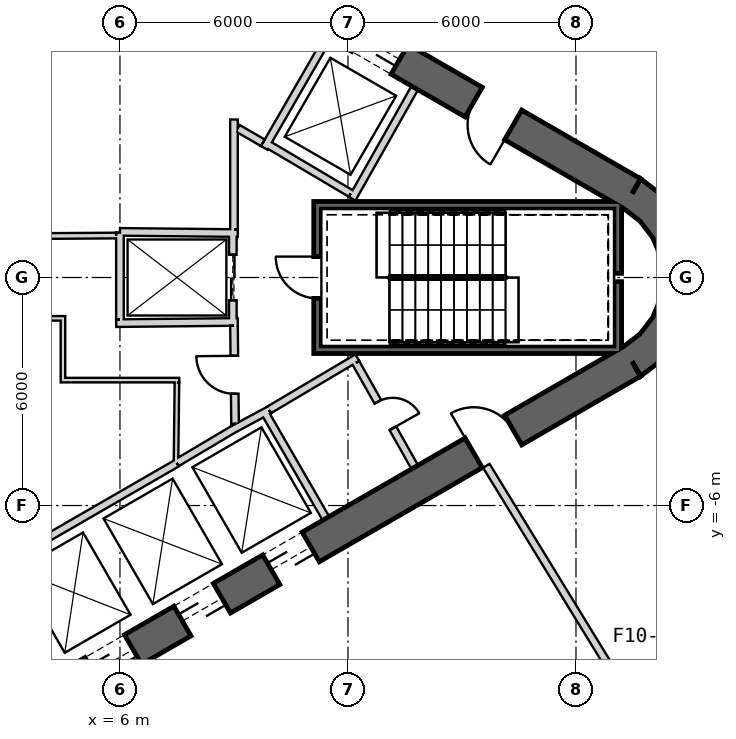
"""IFC4 building model, lengths in metres.
Left out: names, types, materials, properties, quantities, classifications, styles, units other than length and angle.
Written with IfcOpenShell. Run it as: python <this file> out.ifc"""

import sys

from ifc_helpers import new_model, si_unit, direction, frame, frame_2d, origin, place, context, subcontext, project, spatial, polyline, rectangle, outline, extrude, element, fill, save


model = new_model("IFC4")
c1 = context("Model", 3, precision=1e-05, world=origin(), true_north=direction((0.0, 1.0)))
c2 = subcontext(c1, "Body", "Model", "MODEL_VIEW")
j1 = project(units=[si_unit("LENGTHUNIT", "METRE"), si_unit("PLANEANGLEUNIT", "RADIAN")], contexts=[c1])
p1 = place(None, origin())
s1 = spatial("IfcSite", under=j1, at=p1, CompositionType="ELEMENT")
p2 = place(p1, origin())
s2 = spatial("IfcBuilding", under=s1, at=p2, CompositionType="ELEMENT")
p3 = place(p2, frame((0.0, 0.0, 156.2)))
s3 = spatial("IfcBuildingStorey", under=s2, at=p3, CompositionType="ELEMENT", Elevation=156.2)
p4 = place(p3, frame((19.475, 2.208, 0.0), z_axis=(0.0, 0.0, 1.0), x_axis=(-0.866028369851, 0.499994862586, 0.0)))
e1 = element("IfcWall", 1, at=p4, inside=s3, PredefinedType="SHEAR", context=c2, shape_type="SweptSolid", body=[
    extrude(rectangle(XDim=31.523, YDim=0.9, at=frame_2d((15.762, 0.0))), origin(), (0.0, 0.0, 1.0), 7.0),
])
p5 = place(p4, frame((7.062, 0.0, 0.0)))
e2 = element("IfcOpeningElement", 2, at=p5, cuts=e1, PredefinedType="OPENING", context=c2, shape_type="SweptSolid", body=[
    extrude(rectangle(XDim=1.2, YDim=2.4, at=frame_2d((0.6, 1.2))), frame((0.0, 0.46, 0.0), z_axis=(0.0, -1.0, 0.0), x_axis=(1.0, 0.0, 0.0)), (0.0, 0.0, 1.0), 0.92),
])
p6 = place(p4, frame((15.162, 0.0, 0.0)))
e3 = element("IfcOpeningElement", 3, at=p6, cuts=e1, PredefinedType="OPENING", context=c2, shape_type="SweptSolid", body=[
    extrude(rectangle(XDim=1.2, YDim=2.4, at=frame_2d((0.6, 1.2))), frame((0.0, 0.46, 0.0), z_axis=(0.0, -1.0, 0.0), x_axis=(1.0, 0.0, 0.0)), (0.0, 0.0, 1.0), 0.92),
])
p7 = place(p4, frame((17.862, 0.0, 0.0)))
e4 = element("IfcOpeningElement", 4, at=p7, cuts=e1, PredefinedType="OPENING", context=c2, shape_type="SweptSolid", body=[
    extrude(rectangle(XDim=1.2, YDim=2.4, at=frame_2d((0.6, 1.2))), frame((0.0, 0.46, 0.0), z_axis=(0.0, -1.0, 0.0), x_axis=(1.0, 0.0, 0.0)), (0.0, 0.0, 1.0), 0.92),
])
p8 = place(p4, frame((20.562, 0.0, 0.0)))
e5 = element("IfcOpeningElement", 5, at=p8, cuts=e1, PredefinedType="OPENING", context=c2, shape_type="SweptSolid", body=[
    extrude(rectangle(XDim=1.2, YDim=2.4, at=frame_2d((0.6, 1.2))), frame((0.0, 0.46, 0.0), z_axis=(0.0, -1.0, 0.0), x_axis=(1.0, 0.0, 0.0)), (0.0, 0.0, 1.0), 0.92),
])
p9 = place(p4, frame((23.262, 0.0, 0.0)))
e6 = element("IfcOpeningElement", 6, at=p9, cuts=e1, PredefinedType="OPENING", context=c2, shape_type="SweptSolid", body=[
    extrude(rectangle(XDim=1.2, YDim=2.4, at=frame_2d((0.6, 1.2))), frame((0.0, 0.46, 0.0), z_axis=(0.0, -1.0, 0.0), x_axis=(1.0, 0.0, 0.0)), (0.0, 0.0, 1.0), 0.92),
])
p10 = place(p4, frame((3.612, 0.0, 0.0)))
e7 = element("IfcOpeningElement", 7, at=p10, cuts=e1, PredefinedType="OPENING", context=c2, shape_type="SweptSolid", body=[
    extrude(rectangle(XDim=1.2, YDim=2.4, at=frame_2d((0.6, 1.2))), frame((0.0, 0.46, 0.0), z_axis=(0.0, -1.0, 0.0), x_axis=(1.0, 0.0, 0.0)), (0.0, 0.0, 1.0), 0.92),
])
p11 = place(p4, frame((26.712, 0.0, 0.0)))
e8 = element("IfcOpeningElement", 8, at=p11, cuts=e1, PredefinedType="OPENING", context=c2, shape_type="SweptSolid", body=[
    extrude(rectangle(XDim=1.2, YDim=2.4, at=frame_2d((0.6, 1.2))), frame((0.0, 0.46, 0.0), z_axis=(0.0, -1.0, 0.0), x_axis=(1.0, 0.0, 0.0)), (0.0, 0.0, 1.0), 0.92),
])
p12 = place(p3, frame((-7.825, -17.97, 0.0), z_axis=(0.0, 0.0, 1.0), x_axis=(0.866028369851, 0.499994862586, 0.0)))
e9 = element("IfcWall", 9, at=p12, inside=s3, PredefinedType="SHEAR", context=c2, shape_type="SweptSolid", body=[
    extrude(rectangle(XDim=31.523, YDim=0.9, at=frame_2d((15.762, 0.0))), origin(), (0.0, 0.0, 1.0), 7.0),
])
p13 = place(p12, frame((7.062, 0.0, 0.0)))
e10 = element("IfcOpeningElement", 10, at=p13, cuts=e9, PredefinedType="OPENING", context=c2, shape_type="SweptSolid", body=[
    extrude(rectangle(XDim=1.2, YDim=2.4, at=frame_2d((0.6, 1.2))), frame((0.0, 0.46, 0.0), z_axis=(0.0, -1.0, 0.0), x_axis=(1.0, 0.0, 0.0)), (0.0, 0.0, 1.0), 0.92),
])
p14 = place(p12, frame((9.762, 0.0, 0.0)))
e11 = element("IfcOpeningElement", 11, at=p14, cuts=e9, PredefinedType="OPENING", context=c2, shape_type="SweptSolid", body=[
    extrude(rectangle(XDim=1.2, YDim=2.4, at=frame_2d((0.6, 1.2))), frame((0.0, 0.46, 0.0), z_axis=(0.0, -1.0, 0.0), x_axis=(1.0, 0.0, 0.0)), (0.0, 0.0, 1.0), 0.92),
])
p15 = place(p12, frame((12.462, 0.0, 0.0)))
e12 = element("IfcOpeningElement", 12, at=p15, cuts=e9, PredefinedType="OPENING", context=c2, shape_type="SweptSolid", body=[
    extrude(rectangle(XDim=1.2, YDim=2.4, at=frame_2d((0.6, 1.2))), frame((0.0, 0.46, 0.0), z_axis=(0.0, -1.0, 0.0), x_axis=(1.0, 0.0, 0.0)), (0.0, 0.0, 1.0), 0.92),
])
p16 = place(p12, frame((15.162, 0.0, 0.0)))
e13 = element("IfcOpeningElement", 13, at=p16, cuts=e9, PredefinedType="OPENING", context=c2, shape_type="SweptSolid", body=[
    extrude(rectangle(XDim=1.2, YDim=2.4, at=frame_2d((0.6, 1.2))), frame((0.0, 0.46, 0.0), z_axis=(0.0, -1.0, 0.0), x_axis=(1.0, 0.0, 0.0)), (0.0, 0.0, 1.0), 0.92),
])
p17 = place(p12, frame((17.862, 0.0, 0.0)))
e14 = element("IfcOpeningElement", 14, at=p17, cuts=e9, PredefinedType="OPENING", context=c2, shape_type="SweptSolid", body=[
    extrude(rectangle(XDim=1.2, YDim=2.4, at=frame_2d((0.6, 1.2))), frame((0.0, 0.46, 0.0), z_axis=(0.0, -1.0, 0.0), x_axis=(1.0, 0.0, 0.0)), (0.0, 0.0, 1.0), 0.92),
])
p18 = place(p12, frame((20.562, 0.0, 0.0)))
e15 = element("IfcOpeningElement", 15, at=p18, cuts=e9, PredefinedType="OPENING", context=c2, shape_type="SweptSolid", body=[
    extrude(rectangle(XDim=1.2, YDim=2.4, at=frame_2d((0.6, 1.2))), frame((0.0, 0.46, 0.0), z_axis=(0.0, -1.0, 0.0), x_axis=(1.0, 0.0, 0.0)), (0.0, 0.0, 1.0), 0.92),
])
p19 = place(p12, frame((26.712, 0.0, 0.0)))
e16 = element("IfcOpeningElement", 16, at=p19, cuts=e9, PredefinedType="OPENING", context=c2, shape_type="SweptSolid", body=[
    extrude(rectangle(XDim=1.2, YDim=2.4, at=frame_2d((0.6, 1.2))), frame((0.0, 0.46, 0.0), z_axis=(0.0, -1.0, 0.0), x_axis=(1.0, 0.0, 0.0)), (0.0, 0.0, 1.0), 0.92),
])
p20 = place(p12, frame((3.612, 0.0, 0.0)))
e17 = element("IfcOpeningElement", 17, at=p20, cuts=e9, PredefinedType="OPENING", context=c2, shape_type="SweptSolid", body=[
    extrude(rectangle(XDim=1.2, YDim=2.4, at=frame_2d((0.6, 1.2))), frame((0.0, 0.46, 0.0), z_axis=(0.0, -1.0, 0.0), x_axis=(1.0, 0.0, 0.0)), (0.0, 0.0, 1.0), 0.92),
])
p21 = place(p3, origin())
e18 = element("IfcWall", 18, at=p21, inside=s3, PredefinedType="SHEAR", context=c2, shape_type="SweptSolid", body=[
    extrude(outline(polyline([(19.7, -2.598), (20.321, -2.121), (20.798, -1.5), (21.098, -0.777), (21.2, 0.0), (21.098, 0.777), (20.798, 1.5), (20.321, 2.121), (19.7, 2.598), (19.25, 1.819), (19.685, 1.485), (20.019, 1.05), (20.229, 0.543), (20.3, 0.0), (20.229, -0.543), (20.019, -1.05), (19.685, -1.485), (19.25, -1.819), (19.7, -2.598)])), origin(), (0.0, 0.0, 1.0), 7.0),
])
p22 = place(p3, frame((12.11, 2.073, 0.0), z_axis=(0.0, 0.0, 1.0), x_axis=(0.49196600604, 0.870614408852, 0.0)))
e19 = element("IfcWall", 19, at=p22, inside=s3, PredefinedType="PLUMBINGWALL", context=c2, shape_type="SweptSolid", body=[
    extrude(rectangle(XDim=3.35, YDim=0.2, at=frame_2d((1.675, 0.0))), origin(), (0.0, 0.0, 1.0), 6.65),
])
p23 = place(p3, frame((12.073, 2.211, 0.0), z_axis=(0.0, 0.0, 1.0), x_axis=(-0.860436389768, 0.509557866354, 0.0)))
e20 = element("IfcWall", 20, at=p23, inside=s3, PredefinedType="PLUMBINGWALL", context=c2, shape_type="SweptSolid", body=[
    extrude(rectangle(XDim=2.6, YDim=0.2, at=frame_2d((1.3, 0.0))), origin(), (0.0, 0.0, 1.0), 6.65),
])
p24 = place(p3, frame((9.797, 3.408, 0.0), z_axis=(0.0, 0.0, 1.0), x_axis=(0.499987396469, 0.866032680314, 0.0)))
e21 = element("IfcWall", 21, at=p24, inside=s3, PredefinedType="PLUMBINGWALL", context=c2, shape_type="SweptSolid", body=[
    extrude(rectangle(XDim=3.35, YDim=0.2, at=frame_2d((1.675, 0.0))), origin(), (0.0, 0.0, 1.0), 6.65),
])
p25 = place(p3, frame((0.483, -8.936, 0.0), z_axis=(0.0, 0.0, 1.0), x_axis=(0.866030989016, 0.499990325971, 0.0)))
e22 = element("IfcWall", 22, at=p25, inside=s3, PredefinedType="PLUMBINGWALL", context=c2, shape_type="SweptSolid", body=[
    extrude(rectangle(XDim=8.1, YDim=0.2, at=frame_2d((4.05, 0.0))), origin(), (0.0, 0.0, 1.0), 6.65),
])
p26 = place(p3, frame((9.795, -3.525, 0.0), z_axis=(0.0, 0.0, 1.0), x_axis=(0.499984717929, -0.866034226713, 0.0)))
e23 = element("IfcWall", 23, at=p26, inside=s3, PredefinedType="PLUMBINGWALL", context=c2, shape_type="SweptSolid", body=[
    extrude(rectangle(XDim=3.25, YDim=0.2, at=frame_2d((1.625, 0.0))), origin(), (0.0, 0.0, 1.0), 6.65),
])
p27 = place(p3, frame((8.974, -3.999, 0.0), z_axis=(0.0, 0.0, 1.0), x_axis=(0.880907015104, 0.473289373154, 0.0)))
e24 = element("IfcWall", 24, at=p27, inside=s3, PredefinedType="PLUMBINGWALL", context=c2, shape_type="SweptSolid", body=[
    extrude(rectangle(XDim=1.078, YDim=0.2, at=frame_2d((0.539, 0.0))), origin(), (0.0, 0.0, 1.0), 6.65),
])
p28 = place(p3, frame((7.493, -4.878, 0.0), z_axis=(0.0, 0.0, 1.0), x_axis=(0.859981807212, 0.510324691999, 0.0)))
e25 = element("IfcWall", 25, at=p28, inside=s3, PredefinedType="PLUMBINGWALL", context=c2, shape_type="SweptSolid", body=[
    extrude(rectangle(XDim=1.845, YDim=0.2, at=frame_2d((0.922, 0.0))), origin(), (0.0, 0.0, 1.0), 6.65),
])
p29 = place(p3, frame((19.2, 1.9, -0.35), z_axis=(0.0, 0.0, 1.0), x_axis=(-1.0, 0.0, 0.0)))
e26 = element("IfcWall", 26, at=p29, inside=s3, PredefinedType="SHEAR", context=c2, shape_type="SweptSolid", body=[
    extrude(rectangle(XDim=8.1, YDim=0.2, at=frame_2d((4.05, 0.0))), origin(), (0.0, 0.0, 1.0), 7.0),
])
p30 = place(p3, frame((19.1, -2.0, -0.35), z_axis=(0.0, 0.0, 1.0), x_axis=(0.0, 1.0, 0.0)))
e27 = element("IfcWall", 27, at=p30, inside=s3, PredefinedType="SHEAR", context=c2, shape_type="SweptSolid", body=[
    extrude(rectangle(XDim=1.89, YDim=0.2, at=frame_2d((0.945, 0.0))), origin(), (0.0, 0.0, 1.0), 7.0),
])
p31 = place(p3, frame((19.1, 0.11, -0.35), z_axis=(0.0, 0.0, 1.0), x_axis=(0.0, 1.0, 0.0)))
e28 = element("IfcWall", 28, at=p31, inside=s3, PredefinedType="SHEAR", context=c2, shape_type="SweptSolid", body=[
    extrude(rectangle(XDim=1.69, YDim=0.2, at=frame_2d((0.845, 0.0))), origin(), (0.0, 0.0, 1.0), 7.0),
])
p32 = place(p3, frame((11.1, -1.9, -0.35), z_axis=(0.0, 0.0, 1.0), x_axis=(1.0, 0.0, 0.0)))
e29 = element("IfcWall", 29, at=p32, inside=s3, PredefinedType="SHEAR", context=c2, shape_type="SweptSolid", body=[
    extrude(rectangle(XDim=7.9, YDim=0.2, at=frame_2d((3.95, 0.0))), origin(), (0.0, 0.0, 1.0), 7.0),
])
p33 = place(p3, frame((11.2, -1.8, -0.35), z_axis=(0.0, 0.0, 1.0), x_axis=(0.0, 1.0, 0.0)))
e30 = element("IfcWall", 30, at=p33, inside=s3, PredefinedType="SHEAR", context=c2, shape_type="SweptSolid", body=[
    extrude(rectangle(XDim=3.6, YDim=0.2, at=frame_2d((1.8, 0.0))), origin(), (0.0, 0.0, 1.0), 7.0),
])
p34 = place(p33, frame((1.25, 0.0, 0.35)))
e31 = element("IfcOpeningElement", 31, at=p34, cuts=e30, PredefinedType="OPENING", context=c2, shape_type="SweptSolid", body=[
    extrude(rectangle(XDim=1.1, YDim=2.1, at=frame_2d((0.55, 1.05))), frame((0.0, 0.11, 0.0), z_axis=(0.0, -1.0, 0.0), x_axis=(1.0, 0.0, 0.0)), (0.0, 0.0, 1.0), 0.22),
])
p35 = place(p3, frame((8.97, 1.2, 0.0), z_axis=(0.0, 0.0, 1.0), x_axis=(0.0, -1.0, 0.0)))
e32 = element("IfcWall", 32, at=p35, inside=s3, PredefinedType="PLUMBINGWALL", context=c2, shape_type="SweptSolid", body=[
    extrude(rectangle(XDim=2.4, YDim=0.2, at=frame_2d((1.2, 0.0))), origin(), (0.0, 0.0, 1.0), 6.65),
])
p36 = place(p35, frame((0.6, 0.0, 0.0)))
e33 = element("IfcOpeningElement", 33, at=p36, cuts=e32, PredefinedType="OPENING", context=c2, shape_type="SweptSolid", body=[
    extrude(rectangle(XDim=1.2, YDim=2.4, at=frame_2d((0.6, 1.2))), frame((0.0, 0.11, 0.0), z_axis=(0.0, -1.0, 0.0), x_axis=(1.0, 0.0, 0.0)), (0.0, 0.0, 1.0), 0.22),
])
p37 = place(p3, frame((6.0, 1.2, 0.0), z_axis=(0.0, 0.0, 1.0), x_axis=(0.999949988, -0.010001074852, 0.0)))
e34 = element("IfcWall", 34, at=p37, inside=s3, PredefinedType="PLUMBINGWALL", context=c2, shape_type="SweptSolid", body=[
    extrude(rectangle(XDim=3.1, YDim=0.2, at=frame_2d((1.55, 0.0))), origin(), (0.0, 0.0, 1.0), 6.65),
])
p38 = place(p3, frame((5.9, -1.201, 0.0), z_axis=(0.0, 0.0, 1.0), x_axis=(0.999950064753, 0.009993397809, 0.0)))
e35 = element("IfcWall", 35, at=p38, inside=s3, PredefinedType="PLUMBINGWALL", context=c2, shape_type="SweptSolid", body=[
    extrude(rectangle(XDim=3.2, YDim=0.2, at=frame_2d((1.6, 0.0))), origin(), (0.0, 0.0, 1.0), 6.65),
])
p39 = place(p3, frame((6.0, -1.1, 0.0), z_axis=(0.0, 0.0, 1.0), x_axis=(0.0, 1.0, 0.0)))
e36 = element("IfcWall", 36, at=p39, inside=s3, PredefinedType="PLUMBINGWALL", context=c2, shape_type="SweptSolid", body=[
    extrude(rectangle(XDim=2.28, YDim=0.2, at=frame_2d((1.14, 0.0))), origin(), (0.0, 0.0, 1.0), 6.65),
])
p40 = place(p3, frame((12.245, -2.109, 0.0), z_axis=(0.0, 0.0, 1.0), x_axis=(-0.860414880418, -0.509594185166, 0.0)))
e37 = element("IfcWall", 37, at=p40, inside=s3, PredefinedType="PARTITIONING", context=c2, shape_type="SweptSolid", body=[
    extrude(rectangle(XDim=2.7, YDim=0.2, at=frame_2d((1.35, 0.0))), origin(), (0.0, 0.0, 1.0), 6.65),
])
p41 = place(p3, frame((13.758, -4.99, 0.0), z_axis=(0.0, 0.0, 1.0), x_axis=(-0.491993409184, 0.87059892334, 0.0)))
e38 = element("IfcWall", 38, at=p41, inside=s3, PredefinedType="PARTITIONING", context=c2, shape_type="SweptSolid", body=[
    extrude(rectangle(XDim=3.15, YDim=0.2, at=frame_2d((1.575, 0.0))), origin(), (0.0, 0.0, 1.0), 6.65),
])
p42 = place(p41, frame((1.175, 0.0, 0.0)))
e39 = element("IfcOpeningElement", 39, at=p42, cuts=e38, PredefinedType="OPENING", context=c2, shape_type="SweptSolid", body=[
    extrude(rectangle(XDim=0.8, YDim=2.1, at=frame_2d((0.4, 1.05))), frame((0.0, 0.11, 0.0), z_axis=(0.0, -1.0, 0.0), x_axis=(1.0, 0.0, 0.0)), (0.0, 0.0, 1.0), 0.22),
])
p43 = place(p3, frame((9.0, 1.27, 0.0), z_axis=(0.0, 0.0, 1.0), x_axis=(0.0, 1.0, 0.0)))
e40 = element("IfcWall", 40, at=p43, inside=s3, PredefinedType="PARTITIONING", context=c2, shape_type="SweptSolid", body=[
    extrude(rectangle(XDim=2.887, YDim=0.2, at=frame_2d((1.443, 0.0))), origin(), (0.0, 0.0, 1.0), 6.65),
])
p44 = place(p3, frame((9.76, 3.545, 0.0), z_axis=(0.0, 0.0, 1.0), x_axis=(-0.865966824893, 0.500101447894, 0.0)))
e41 = element("IfcWall", 41, at=p44, inside=s3, PredefinedType="PARTITIONING", context=c2, shape_type="SweptSolid", body=[
    extrude(rectangle(XDim=0.762, YDim=0.2, at=frame_2d((0.381, 0.0))), origin(), (0.0, 0.0, 1.0), 6.65),
])
p45 = place(p3, frame((9.029, -3.851, 0.0), z_axis=(0.0, 0.0, 1.0), x_axis=(-0.010783593937, 0.99994185536, 0.0)))
e42 = element("IfcWall", 42, at=p45, inside=s3, PredefinedType="PARTITIONING", context=c2, shape_type="SweptSolid", body=[
    extrude(rectangle(XDim=2.581, YDim=0.2, at=frame_2d((1.291, 0.0))), origin(), (0.0, 0.0, 1.0), 6.65),
])
p46 = place(p45, frame((0.791, 0.0, 0.0)))
e43 = element("IfcOpeningElement", 43, at=p46, cuts=e42, PredefinedType="OPENING", context=c2, shape_type="SweptSolid", body=[
    extrude(rectangle(XDim=1.0, YDim=2.1, at=frame_2d((0.5, 1.05))), frame((0.0, 0.11, 0.0), z_axis=(0.0, -1.0, 0.0), x_axis=(1.0, 0.0, 0.0)), (0.0, 0.0, 1.0), 0.22),
])
p47 = place(p3, frame((1.388, 1.074, 0.0), z_axis=(0.0, 0.0, 1.0), x_axis=(0.99997856967, 0.006546770205, 0.0)))
e44 = element("IfcWall", 44, at=p47, inside=s3, PredefinedType="PLUMBINGWALL", context=c2, shape_type="SweptSolid", body=[
    extrude(rectangle(XDim=4.512, YDim=0.15, at=frame_2d((2.256, 0.0))), origin(), (0.0, 0.0, 1.0), 6.65),
])
p48 = place(p47, frame((1.92, 0.0, 0.0)))
e45 = element("IfcOpeningElement", 45, at=p48, cuts=e44, PredefinedType="OPENING", context=c2, shape_type="SweptSolid", body=[
    extrude(rectangle(XDim=0.8, YDim=2.1, at=frame_2d((0.4, 1.05))), frame((0.0, 0.085, 0.0), z_axis=(0.0, -1.0, 0.0), x_axis=(1.0, 0.0, 0.0)), (0.0, 0.0, 1.0), 0.17),
])
p49 = place(p3, frame((4.56, -1.075, 0.0), z_axis=(0.0, 0.0, 1.0), x_axis=(-1.0, 0.0, 0.0)))
e46 = element("IfcWall", 46, at=p49, inside=s3, PredefinedType="PARTITIONING", context=c2, shape_type="SweptSolid", body=[
    extrude(rectangle(XDim=3.026, YDim=0.12, at=frame_2d((1.513, 0.0))), origin(), (0.0, 0.0, 1.0), 6.65),
])
p50 = place(p3, frame((4.5, -2.76, 0.0), z_axis=(0.0, 0.0, 1.0), x_axis=(0.0, 1.0, 0.0)))
e47 = element("IfcWall", 47, at=p50, inside=s3, PredefinedType="PARTITIONING", context=c2, shape_type="SweptSolid", body=[
    extrude(rectangle(XDim=1.625, YDim=0.12, at=frame_2d((0.812, 0.0))), origin(), (0.0, 0.0, 1.0), 6.65),
])
p51 = place(p3, frame((7.56, -2.7, 0.0), z_axis=(0.0, 0.0, 1.0), x_axis=(-1.0, 0.0, 0.0)))
e48 = element("IfcWall", 48, at=p51, inside=s3, PredefinedType="PARTITIONING", context=c2, shape_type="SweptSolid", body=[
    extrude(rectangle(XDim=3.0, YDim=0.12, at=frame_2d((1.5, 0.0))), origin(), (0.0, 0.0, 1.0), 6.65),
])
p52 = place(p3, frame((7.475, -4.865, 0.0), z_axis=(0.0, 0.0, 1.0), x_axis=(0.011716133148, 0.999931363757, 0.0)))
e49 = element("IfcWall", 49, at=p52, inside=s3, PredefinedType="PARTITIONING", context=c2, shape_type="SweptSolid", body=[
    extrude(rectangle(XDim=2.105, YDim=0.12, at=frame_2d((1.052, 0.0))), origin(), (0.0, 0.0, 1.0), 6.65),
])
p53 = place(p3, frame((22.631, -16.369, 0.0), z_axis=(0.0, 0.0, 1.0), x_axis=(-0.522292365044, 0.852766489384, 0.0)))
e50 = element("IfcWall", 50, at=p53, inside=s3, PredefinedType="PARTITIONING", context=c2, shape_type="SweptSolid", body=[
    extrude(rectangle(XDim=13.396, YDim=0.2, at=frame_2d((6.698, 0.0))), origin(), (0.0, 0.0, 1.0), 5.612),
])
p54 = place(p53, frame((6.2, 0.0, 0.0)))
e51 = element("IfcOpeningElement", 51, at=p54, cuts=e50, PredefinedType="OPENING", context=c2, shape_type="SweptSolid", body=[
    extrude(rectangle(XDim=1.0, YDim=2.1, at=frame_2d((0.5, 1.05))), frame((0.0, 0.11, 0.0), z_axis=(0.0, -1.0, 0.0), x_axis=(1.0, 0.0, 0.0)), (0.0, 0.0, 1.0), 0.22),
])
p55 = place(p34, origin())
e52 = element("IfcDoor", 52, at=p55, inside=s3, OperationType="SINGLE_SWING_RIGHT", PredefinedType="USERDEFINED", context=c2, shape_type="SweptSolid", body=[
    extrude(rectangle(XDim=1.1, YDim=2.1, at=frame_2d((0.55, 1.05))), frame((0.0, 0.025, 0.0), z_axis=(0.0, -1.0, 0.0), x_axis=(1.0, 0.0, 0.0)), (0.0, 0.0, 1.0), 0.05),
])
fill(e31, e52)
p56 = place(p46, origin())
e53 = element("IfcDoor", 53, at=p56, inside=s3, OperationType="SINGLE_SWING_RIGHT", PredefinedType="USERDEFINED", context=c2, shape_type="SweptSolid", body=[
    extrude(rectangle(XDim=1.0, YDim=2.1, at=frame_2d((0.5, 1.05))), frame((0.0, 0.025, 0.0), z_axis=(0.0, -1.0, 0.0), x_axis=(1.0, 0.0, 0.0)), (0.0, 0.0, 1.0), 0.05),
])
fill(e43, e53)
p57 = place(p36, origin())
e54 = element("IfcDoor", 54, at=p57, inside=s3, OperationType="SLIDING_TO_LEFT", PredefinedType="USERDEFINED", context=c2, shape_type="SweptSolid", body=[
    extrude(rectangle(XDim=1.2, YDim=2.4, at=frame_2d((0.6, 1.2))), frame((0.0, 0.025, 0.0), z_axis=(0.0, -1.0, 0.0), x_axis=(1.0, 0.0, 0.0)), (0.0, 0.0, 1.0), 0.05),
])
fill(e33, e54)
p58 = place(p42, origin())
e55 = element("IfcDoor", 55, at=p58, inside=s3, OperationType="SINGLE_SWING_LEFT", PredefinedType="USERDEFINED", context=c2, shape_type="SweptSolid", body=[
    extrude(rectangle(XDim=0.8, YDim=2.1, at=frame_2d((0.4, 1.05))), frame((0.0, 0.025, 0.0), z_axis=(0.0, -1.0, 0.0), x_axis=(1.0, 0.0, 0.0)), (0.0, 0.0, 1.0), 0.05),
])
fill(e39, e55)
p59 = place(p5, origin())
e56 = element("IfcDoor", 56, at=p59, inside=s3, OperationType="SLIDING_TO_LEFT", PredefinedType="USERDEFINED", context=c2, shape_type="SweptSolid", body=[
    extrude(rectangle(XDim=1.2, YDim=2.4, at=frame_2d((0.6, 1.2))), frame((0.0, 0.025, 0.0), z_axis=(0.0, -1.0, 0.0), x_axis=(1.0, 0.0, 0.0)), (0.0, 0.0, 1.0), 0.05),
])
fill(e2, e56)
p60 = place(p16, origin())
e57 = element("IfcDoor", 57, at=p60, inside=s3, OperationType="SLIDING_TO_LEFT", PredefinedType="USERDEFINED", context=c2, shape_type="SweptSolid", body=[
    extrude(rectangle(XDim=1.2, YDim=2.4, at=frame_2d((0.6, 1.2))), frame((0.0, 0.025, 0.0), z_axis=(0.0, -1.0, 0.0), x_axis=(1.0, 0.0, 0.0)), (0.0, 0.0, 1.0), 0.05),
])
fill(e13, e57)
p61 = place(p17, origin())
e58 = element("IfcDoor", 58, at=p61, inside=s3, OperationType="SLIDING_TO_LEFT", PredefinedType="USERDEFINED", context=c2, shape_type="SweptSolid", body=[
    extrude(rectangle(XDim=1.2, YDim=2.4, at=frame_2d((0.6, 1.2))), frame((0.0, 0.025, 0.0), z_axis=(0.0, -1.0, 0.0), x_axis=(1.0, 0.0, 0.0)), (0.0, 0.0, 1.0), 0.05),
])
fill(e14, e58)
p62 = place(p18, origin())
e59 = element("IfcDoor", 59, at=p62, inside=s3, OperationType="SLIDING_TO_LEFT", PredefinedType="USERDEFINED", context=c2, shape_type="SweptSolid", body=[
    extrude(rectangle(XDim=1.2, YDim=2.4, at=frame_2d((0.6, 1.2))), frame((0.0, 0.025, 0.0), z_axis=(0.0, -1.0, 0.0), x_axis=(1.0, 0.0, 0.0)), (0.0, 0.0, 1.0), 0.05),
])
fill(e15, e59)
p63 = place(p19, origin())
e60 = element("IfcDoor", 60, at=p63, inside=s3, OperationType="SINGLE_SWING_LEFT", PredefinedType="USERDEFINED", context=c2, shape_type="SweptSolid", body=[
    extrude(rectangle(XDim=1.2, YDim=2.4, at=frame_2d((0.6, 1.2))), frame((0.0, 0.025, 0.0), z_axis=(0.0, -1.0, 0.0), x_axis=(1.0, 0.0, 0.0)), (0.0, 0.0, 1.0), 0.05),
])
fill(e16, e60)
p64 = place(p10, origin())
e61 = element("IfcDoor", 61, at=p64, inside=s3, OperationType="SINGLE_SWING_LEFT", PredefinedType="USERDEFINED", context=c2, shape_type="SweptSolid", body=[
    extrude(rectangle(XDim=1.2, YDim=2.4, at=frame_2d((0.6, 1.2))), frame((0.0, 0.025, 0.0), z_axis=(0.0, -1.0, 0.0), x_axis=(1.0, 0.0, 0.0)), (0.0, 0.0, 1.0), 0.05),
])
fill(e7, e61)
save(model, sys.argv[1])
